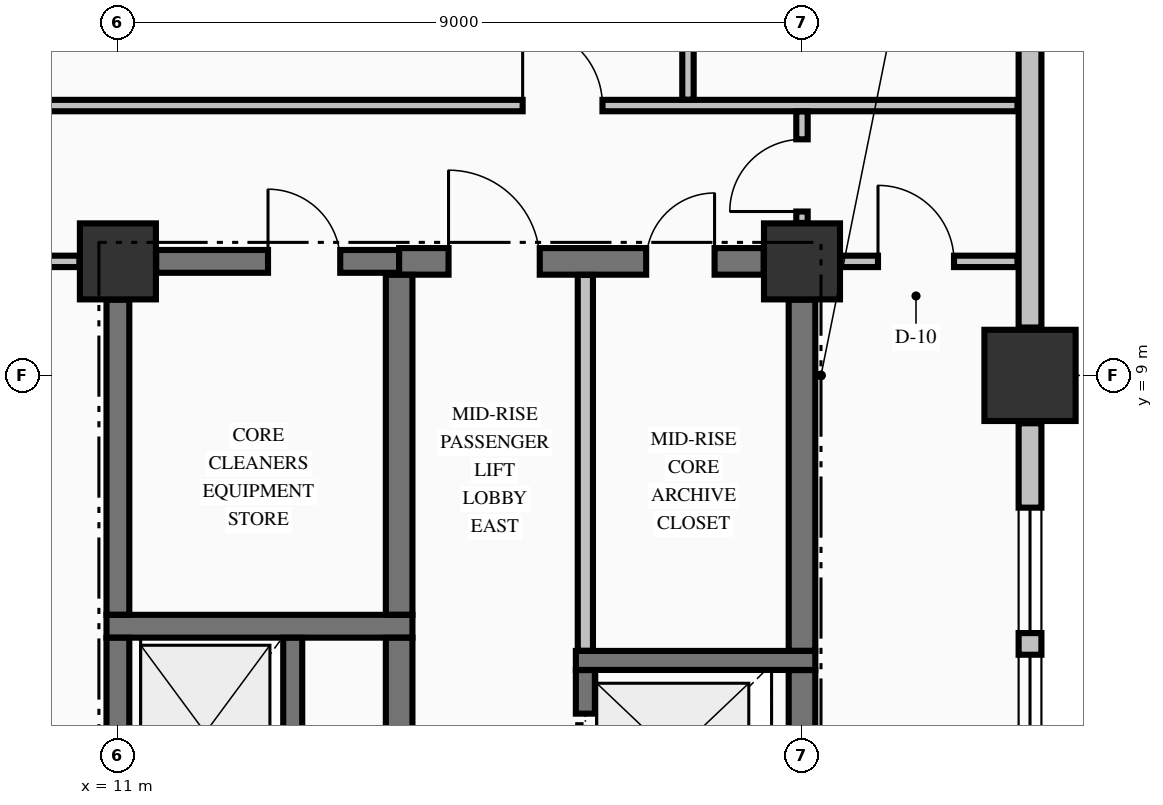
"""IFC4 building model, lengths in metres.
Left out: names, types, materials, properties, quantities, classifications, styles, units other than length and angle.
Written with IfcOpenShell. Run it as: python <this file> out.ifc"""

import sys

from ifc_helpers import new_model, si_unit, direction, frame, frame_2d, origin, origin_2d, place, context, subcontext, project, spatial, rectangle, extrude, element, fill, save


model = new_model("IFC4")
c1 = context("Model", 3, precision=1e-05, world=origin(), true_north=direction((0.0, 1.0)))
c2 = subcontext(c1, "Body", "Model", "MODEL_VIEW")
j1 = project(units=[si_unit("LENGTHUNIT", "METRE"), si_unit("PLANEANGLEUNIT", "RADIAN")], contexts=[c1])
p1 = place(None, origin())
s1 = spatial("IfcSite", under=j1, at=p1, CompositionType="ELEMENT")
p2 = place(p1, origin())
s2 = spatial("IfcBuilding", under=s1, at=p2, CompositionType="ELEMENT")
p3 = place(p2, frame((0.0, 0.0, 135.63)))
s3 = spatial("IfcBuildingStorey", under=s2, at=p3, CompositionType="ELEMENT", Elevation=135.63)
p4 = place(p3, frame((23.0, 9.0, -0.25), z_axis=(0.0, 0.0, 1.0), x_axis=(1.0, 0.0, 0.0)))
e1 = element("IfcColumn", 1, at=p4, inside=s3, PredefinedType="COLUMN", context=c2, shape_type="SweptSolid", body=[
    extrude(rectangle(XDim=1.2, YDim=1.2, at=origin_2d()), origin(), (0.0, 0.0, 1.0), 3.57),
])
for number, where, z_axis, x_axis in (
    (2, (11.0, 10.5, -0.25), (0.0, 0.0, 1.0), (1.0, 0.0, 0.0)),
    (3, (20.0, 10.5, -0.25), (0.0, 0.0, 1.0), (1.0, 0.0, 0.0)),
):
    element("IfcColumn", number, at=place(p3, frame(where, z_axis=z_axis, x_axis=x_axis)), inside=s3, PredefinedType="COLUMN", context=c2, shape_type="SweptSolid", body=[
        extrude(rectangle(XDim=1.0, YDim=1.0, at=origin_2d()), origin(), (0.0, 0.0, 1.0), 3.57),
    ])
p5 = place(p3, frame((23.0, 0.63, 0.0), z_axis=(0.0, 0.0, 1.0), x_axis=(0.0, 1.0, 0.0)))
e4 = element("IfcWall", 4, at=p5, inside=s3, PredefinedType="STANDARD", context=c2, shape_type="SweptSolid", body=[
    extrude(rectangle(XDim=7.74, YDim=0.3, at=frame_2d((3.87, 0.0))), origin(), (0.0, 0.0, 1.0), 2.712),
])
p6 = place(p5, frame((1.11, 0.0, 0.8)))
e5 = element("IfcOpeningElement", 5, at=p6, cuts=e4, PredefinedType="OPENING", context=c2, shape_type="SweptSolid", body=[
    extrude(rectangle(XDim=1.65, YDim=1.7, at=frame_2d((0.825, 0.85))), frame((0.0, 0.16, 0.0), z_axis=(0.0, -1.0, 0.0), x_axis=(1.0, 0.0, 0.0)), (0.0, 0.0, 1.0), 0.32),
])
p7 = place(p5, frame((3.045, 0.0, 0.8)))
e6 = element("IfcOpeningElement", 6, at=p7, cuts=e4, PredefinedType="OPENING", context=c2, shape_type="SweptSolid", body=[
    extrude(rectangle(XDim=1.65, YDim=1.7, at=frame_2d((0.825, 0.85))), frame((0.0, 0.16, 0.0), z_axis=(0.0, -1.0, 0.0), x_axis=(1.0, 0.0, 0.0)), (0.0, 0.0, 1.0), 0.32),
])
p8 = place(p5, frame((4.98, 0.0, 0.8)))
e7 = element("IfcOpeningElement", 7, at=p8, cuts=e4, PredefinedType="OPENING", context=c2, shape_type="SweptSolid", body=[
    extrude(rectangle(XDim=1.65, YDim=1.7, at=frame_2d((0.825, 0.85))), frame((0.0, 0.16, 0.0), z_axis=(0.0, -1.0, 0.0), x_axis=(1.0, 0.0, 0.0)), (0.0, 0.0, 1.0), 0.32),
])
p9 = place(p3, frame((23.0, 9.63, 0.0), z_axis=(0.0, 0.0, 1.0), x_axis=(0.0, 1.0, 0.0)))
e8 = element("IfcWall", 8, at=p9, inside=s3, PredefinedType="STANDARD", context=c2, shape_type="SweptSolid", body=[
    extrude(rectangle(XDim=10.74, YDim=0.3, at=frame_2d((5.37, 0.0))), origin(), (0.0, 0.0, 1.0), 2.712),
])
p10 = place(p3, frame((17.025, 5.25, 0.0), z_axis=(0.0, 0.0, 1.0), x_axis=(1.0, 0.0, 0.0)))
e9 = element("IfcWall", 9, at=p10, inside=s3, PredefinedType="SOLIDWALL", context=c2, shape_type="SweptSolid", body=[
    extrude(rectangle(XDim=3.15, YDim=0.25, at=frame_2d((1.575, 0.0))), origin(), (0.0, 0.0, 1.0), 3.32),
])
p11 = place(p3, frame((10.85, 5.7, 0.0), z_axis=(0.0, 0.0, 1.0), x_axis=(1.0, 0.0, 0.0)))
e10 = element("IfcWall", 10, at=p11, inside=s3, PredefinedType="SHEAR", context=c2, shape_type="SweptSolid", body=[
    extrude(rectangle(XDim=4.025, YDim=0.3, at=frame_2d((2.012, 0.0))), origin(), (0.0, 0.0, 1.0), 3.32),
])
p12 = place(p3, frame((11.504, 10.5, 0.0), z_axis=(0.0, 0.0, 1.0), x_axis=(1.0, 0.0, 0.0)))
e11 = element("IfcWall", 11, at=p12, inside=s3, PredefinedType="SHEAR", context=c2, shape_type="SweptSolid", body=[
    extrude(rectangle(XDim=3.196, YDim=0.3, at=frame_2d((1.598, 0.0))), origin(), (0.0, 0.0, 1.0), 3.32),
])
p13 = place(p12, frame((1.471, 0.0, 0.0)))
e12 = element("IfcOpeningElement", 12, at=p13, cuts=e11, PredefinedType="OPENING", context=c2, shape_type="SweptSolid", body=[
    extrude(rectangle(XDim=0.95, YDim=2.15, at=frame_2d((0.475, 1.075))), frame((0.0, 0.16, 0.0), z_axis=(0.0, -1.0, 0.0), x_axis=(1.0, 0.0, 0.0)), (0.0, 0.0, 1.0), 0.32),
])
p14 = place(p3, frame((14.7, 10.5, 0.0), z_axis=(0.0, 0.0, 1.0), x_axis=(1.0, 0.0, 0.0)))
e13 = element("IfcWall", 13, at=p14, inside=s3, PredefinedType="SHEAR", context=c2, shape_type="SweptSolid", body=[
    extrude(rectangle(XDim=4.796, YDim=0.35, at=frame_2d((2.398, 0.0))), origin(), (0.0, 0.0, 1.0), 3.32),
])
p15 = place(p14, frame((0.65, 0.0, 0.0)))
e14 = element("IfcOpeningElement", 14, at=p15, cuts=e13, PredefinedType="OPENING", context=c2, shape_type="SweptSolid", body=[
    extrude(rectangle(XDim=1.2, YDim=2.15, at=frame_2d((0.6, 1.075))), frame((0.0, 0.185, 0.0), z_axis=(0.0, -1.0, 0.0), x_axis=(1.0, 0.0, 0.0)), (0.0, 0.0, 1.0), 0.37),
])
p16 = place(p14, frame((3.25, 0.0, 0.0)))
e15 = element("IfcOpeningElement", 15, at=p16, cuts=e13, PredefinedType="OPENING", context=c2, shape_type="SweptSolid", body=[
    extrude(rectangle(XDim=0.9, YDim=2.15, at=frame_2d((0.45, 1.075))), frame((0.0, 0.185, 0.0), z_axis=(0.0, -1.0, 0.0), x_axis=(1.0, 0.0, 0.0)), (0.0, 0.0, 1.0), 0.37),
])
p17 = place(p3, frame((-10.494, 10.5, 0.0), z_axis=(0.0, 0.0, 1.0), x_axis=(1.0, 0.0, 0.0)))
e16 = element("IfcWall", 16, at=p17, inside=s3, PredefinedType="PARTITIONING", context=c2, shape_type="SweptSolid", body=[
    extrude(rectangle(XDim=20.988, YDim=0.15, at=frame_2d((10.494, 0.0))), origin(), (0.0, 0.0, 1.0), 3.32),
])
p18 = place(p17, frame((8.194, 0.0, 0.0)))
e17 = element("IfcOpeningElement", 17, at=p18, cuts=e16, PredefinedType="OPENING", context=c2, shape_type="SweptSolid", body=[
    extrude(rectangle(XDim=1.1, YDim=2.15, at=frame_2d((0.55, 1.075))), frame((0.0, 0.085, 0.0), z_axis=(0.0, -1.0, 0.0), x_axis=(1.0, 0.0, 0.0)), (0.0, 0.0, 1.0), 0.17),
])
p19 = place(p3, frame((20.506, 10.5, 0.0), z_axis=(0.0, 0.0, 1.0), x_axis=(1.0, 0.0, 0.0)))
e18 = element("IfcWall", 18, at=p19, inside=s3, PredefinedType="PARTITIONING", context=c2, shape_type="SweptSolid", body=[
    extrude(rectangle(XDim=2.329, YDim=0.15, at=frame_2d((1.165, 0.0))), origin(), (0.0, 0.0, 1.0), 3.32),
])
p20 = place(p19, frame((0.494, 0.0, 0.0)))
e19 = element("IfcOpeningElement", 19, at=p20, cuts=e18, PredefinedType="OPENING", context=c2, shape_type="SweptSolid", body=[
    extrude(rectangle(XDim=1.0, YDim=2.15, at=frame_2d((0.5, 1.075))), frame((0.0, 0.085, 0.0), z_axis=(0.0, -1.0, 0.0), x_axis=(1.0, 0.0, 0.0)), (0.0, 0.0, 1.0), 0.17),
])
p21 = place(p3, frame((-27.835, 12.55, 0.0), z_axis=(0.0, 0.0, 1.0), x_axis=(1.0, 0.0, 0.0)))
e20 = element("IfcWall", 20, at=p21, inside=s3, PredefinedType="PARTITIONING", context=c2, shape_type="SweptSolid", body=[
    extrude(rectangle(XDim=50.67, YDim=0.15, at=frame_2d((25.335, 0.0))), origin(), (0.0, 0.0, 1.0), 3.32),
])
p22 = place(p21, frame((13.81, 0.0, 0.0)))
e21 = element("IfcOpeningElement", 21, at=p22, cuts=e20, PredefinedType="OPENING", context=c2, shape_type="SweptSolid", body=[
    extrude(rectangle(XDim=1.05, YDim=2.15, at=frame_2d((0.525, 1.075))), frame((0.0, 0.085, 0.0), z_axis=(0.0, -1.0, 0.0), x_axis=(1.0, 0.0, 0.0)), (0.0, 0.0, 1.0), 0.17),
])
p23 = place(p21, frame((25.11, 0.0, 0.0)))
e22 = element("IfcOpeningElement", 22, at=p23, cuts=e20, PredefinedType="OPENING", context=c2, shape_type="SweptSolid", body=[
    extrude(rectangle(XDim=1.05, YDim=2.15, at=frame_2d((0.525, 1.075))), frame((0.0, 0.085, 0.0), z_axis=(0.0, -1.0, 0.0), x_axis=(1.0, 0.0, 0.0)), (0.0, 0.0, 1.0), 0.17),
])
p24 = place(p21, frame((44.16, 0.0, 0.0)))
e23 = element("IfcOpeningElement", 23, at=p24, cuts=e20, PredefinedType="OPENING", context=c2, shape_type="SweptSolid", body=[
    extrude(rectangle(XDim=1.05, YDim=2.15, at=frame_2d((0.525, 1.075))), frame((0.0, 0.085, 0.0), z_axis=(0.0, -1.0, 0.0), x_axis=(1.0, 0.0, 0.0)), (0.0, 0.0, 1.0), 0.17),
])
p25 = place(p3, frame((11.0, 3.052, 0.0), z_axis=(0.0, 0.0, 1.0), x_axis=(0.0, 1.0, 0.0)))
e24 = element("IfcWall", 24, at=p25, inside=s3, PredefinedType="SHEAR", context=c2, shape_type="SweptSolid", body=[
    extrude(rectangle(XDim=2.496, YDim=0.3, at=frame_2d((1.248, 0.0))), origin(), (0.0, 0.0, 1.0), 3.32),
])
p26 = place(p3, frame((11.0, 5.852, 0.0), z_axis=(0.0, 0.0, 1.0), x_axis=(0.0, 1.0, 0.0)))
e25 = element("IfcWall", 25, at=p26, inside=s3, PredefinedType="SHEAR", context=c2, shape_type="SweptSolid", body=[
    extrude(rectangle(XDim=4.144, YDim=0.3, at=frame_2d((2.072, 0.0))), origin(), (0.0, 0.0, 1.0), 3.32),
])
p27 = place(p3, frame((13.3, 3.052, 0.0), z_axis=(0.0, 0.0, 1.0), x_axis=(0.0, 1.0, 0.0)))
e26 = element("IfcWall", 26, at=p27, inside=s3, PredefinedType="SOLIDWALL", context=c2, shape_type="SweptSolid", body=[
    extrude(rectangle(XDim=2.496, YDim=0.25, at=frame_2d((1.248, 0.0))), origin(), (0.0, 0.0, 1.0), 3.32),
])
p28 = place(p3, frame((14.7, 3.052, 0.0), z_axis=(0.0, 0.0, 1.0), x_axis=(0.0, 1.0, 0.0)))
e27 = element("IfcWall", 27, at=p28, inside=s3, PredefinedType="SHEAR", context=c2, shape_type="SweptSolid", body=[
    extrude(rectangle(XDim=2.496, YDim=0.35, at=frame_2d((1.248, 0.0))), origin(), (0.0, 0.0, 1.0), 3.32),
])
p29 = place(p3, frame((14.7, 5.852, 0.0), z_axis=(0.0, 0.0, 1.0), x_axis=(0.0, 1.0, 0.0)))
e28 = element("IfcWall", 28, at=p29, inside=s3, PredefinedType="SHEAR", context=c2, shape_type="SweptSolid", body=[
    extrude(rectangle(XDim=4.471, YDim=0.35, at=frame_2d((2.235, 0.0))), origin(), (0.0, 0.0, 1.0), 3.32),
])
p30 = place(p3, frame((17.15, 2.877, 0.0), z_axis=(0.0, 0.0, 1.0), x_axis=(0.0, 1.0, 0.0)))
e29 = element("IfcWall", 29, at=p30, inside=s3, PredefinedType="SOLIDWALL", context=c2, shape_type="SweptSolid", body=[
    extrude(rectangle(XDim=2.246, YDim=0.25, at=frame_2d((1.123, 0.0))), origin(), (0.0, 0.0, 1.0), 3.32),
])
p31 = place(p30, frame((0.573, 0.0, 0.0)))
e30 = element("IfcOpeningElement", 30, at=p31, cuts=e29, PredefinedType="OPENING", context=c2, shape_type="SweptSolid", body=[
    extrude(rectangle(XDim=1.1, YDim=2.2, at=frame_2d((0.55, 1.1))), frame((0.0, 0.135, 0.0), z_axis=(0.0, -1.0, 0.0), x_axis=(1.0, 0.0, 0.0)), (0.0, 0.0, 1.0), 0.27),
])
p32 = place(p3, frame((20.0, 2.877, 0.0), z_axis=(0.0, 0.0, 1.0), x_axis=(0.0, 1.0, 0.0)))
e31 = element("IfcWall", 31, at=p32, inside=s3, PredefinedType="SHEAR", context=c2, shape_type="SweptSolid", body=[
    extrude(rectangle(XDim=2.246, YDim=0.35, at=frame_2d((1.123, 0.0))), origin(), (0.0, 0.0, 1.0), 3.32),
])
p33 = place(p3, frame((20.0, 5.377, 0.0), z_axis=(0.0, 0.0, 1.0), x_axis=(0.0, 1.0, 0.0)))
e32 = element("IfcWall", 32, at=p33, inside=s3, PredefinedType="SHEAR", context=c2, shape_type="SweptSolid", body=[
    extrude(rectangle(XDim=4.619, YDim=0.35, at=frame_2d((2.31, 0.0))), origin(), (0.0, 0.0, 1.0), 3.32),
])
p34 = place(p3, frame((17.15, 5.378, 0.0), z_axis=(0.0, 0.0, 1.0), x_axis=(0.0, 1.0, 0.0)))
e33 = element("IfcWall", 33, at=p34, inside=s3, PredefinedType="PARTITIONING", context=c2, shape_type="SweptSolid", body=[
    extrude(rectangle(XDim=4.944, YDim=0.2, at=frame_2d((2.472, 0.0))), origin(), (0.0, 0.0, 1.0), 3.32),
])
p35 = place(p3, frame((18.5, 12.628, 0.0), z_axis=(0.0, 0.0, 1.0), x_axis=(0.0, 1.0, 0.0)))
e34 = element("IfcWall", 34, at=p35, inside=s3, PredefinedType="PARTITIONING", context=c2, shape_type="SweptSolid", body=[
    extrude(rectangle(XDim=7.766, YDim=0.15, at=frame_2d((3.883, 0.0))), origin(), (0.0, 0.0, 1.0), 3.32),
])
p36 = place(p3, frame((20.0, 11.006, 0.0), z_axis=(0.0, 0.0, 1.0), x_axis=(0.0, 1.0, 0.0)))
e35 = element("IfcWall", 35, at=p36, inside=s3, PredefinedType="PARTITIONING", context=c2, shape_type="SweptSolid", body=[
    extrude(rectangle(XDim=1.466, YDim=0.15, at=frame_2d((0.733, 0.0))), origin(), (0.0, 0.0, 1.0), 2.81),
])
p37 = place(p36, frame((0.15, 0.0, 0.0)))
e36 = element("IfcOpeningElement", 36, at=p37, cuts=e35, PredefinedType="OPENING", context=c2, shape_type="SweptSolid", body=[
    extrude(rectangle(XDim=0.95, YDim=2.15, at=frame_2d((0.475, 1.075))), frame((0.0, 0.085, 0.0), z_axis=(0.0, -1.0, 0.0), x_axis=(1.0, 0.0, 0.0)), (0.0, 0.0, 1.0), 0.17),
])
p38 = place(p7, origin())
e37 = element("IfcWindow", 37, at=p38, inside=s3, PartitioningType="SINGLE_PANEL", PredefinedType="WINDOW", context=c2, shape_type="SweptSolid", body=[
    extrude(rectangle(XDim=1.65, YDim=1.7, at=frame_2d((0.825, 0.85))), frame((0.0, 0.03, 0.0), z_axis=(0.0, -1.0, 0.0), x_axis=(1.0, 0.0, 0.0)), (0.0, 0.0, 1.0), 0.06),
])
fill(e6, e37)
p39 = place(p8, origin())
e38 = element("IfcWindow", 38, at=p39, inside=s3, PartitioningType="SINGLE_PANEL", PredefinedType="WINDOW", context=c2, shape_type="SweptSolid", body=[
    extrude(rectangle(XDim=1.65, YDim=1.7, at=frame_2d((0.825, 0.85))), frame((0.0, 0.03, 0.0), z_axis=(0.0, -1.0, 0.0), x_axis=(1.0, 0.0, 0.0)), (0.0, 0.0, 1.0), 0.06),
])
fill(e7, e38)
p40 = place(p13, origin())
e39 = element("IfcDoor", 39, at=p40, inside=s3, OperationType="SINGLE_SWING_LEFT", PredefinedType="DOOR", context=c2, shape_type="SweptSolid", body=[
    extrude(rectangle(XDim=0.95, YDim=2.15, at=frame_2d((0.475, 1.075))), frame((0.0, 0.025, 0.0), z_axis=(0.0, -1.0, 0.0), x_axis=(1.0, 0.0, 0.0)), (0.0, 0.0, 1.0), 0.05),
])
fill(e12, e39)
p41 = place(p31, origin())
e40 = element("IfcDoor", 40, at=p41, inside=s3, OperationType="SLIDING_TO_RIGHT", PredefinedType="DOOR", context=c2, shape_type="SweptSolid", body=[
    extrude(rectangle(XDim=1.1, YDim=2.2, at=frame_2d((0.55, 1.1))), frame((0.0, 0.025, 0.0), z_axis=(0.0, -1.0, 0.0), x_axis=(1.0, 0.0, 0.0)), (0.0, 0.0, 1.0), 0.05),
])
fill(e30, e40)
p42 = place(p15, origin())
e41 = element("IfcDoor", 41, at=p42, inside=s3, OperationType="SINGLE_SWING_LEFT", PredefinedType="DOOR", context=c2, shape_type="SweptSolid", body=[
    extrude(rectangle(XDim=1.2, YDim=2.15, at=frame_2d((0.6, 1.075))), frame((0.0, 0.025, 0.0), z_axis=(0.0, -1.0, 0.0), x_axis=(1.0, 0.0, 0.0)), (0.0, 0.0, 1.0), 0.05),
])
fill(e14, e41)
p43 = place(p16, origin())
e42 = element("IfcDoor", 42, at=p43, inside=s3, OperationType="SINGLE_SWING_RIGHT", PredefinedType="DOOR", context=c2, shape_type="SweptSolid", body=[
    extrude(rectangle(XDim=0.9, YDim=2.15, at=frame_2d((0.45, 1.075))), frame((0.0, 0.025, 0.0), z_axis=(0.0, -1.0, 0.0), x_axis=(1.0, 0.0, 0.0)), (0.0, 0.0, 1.0), 0.05),
])
fill(e15, e42)
p44 = place(p24, origin())
e43 = element("IfcDoor", 43, at=p44, inside=s3, OperationType="SINGLE_SWING_LEFT", PredefinedType="DOOR", context=c2, shape_type="SweptSolid", body=[
    extrude(rectangle(XDim=1.05, YDim=2.15, at=frame_2d((0.525, 1.075))), frame((0.0, 0.025, 0.0), z_axis=(0.0, -1.0, 0.0), x_axis=(1.0, 0.0, 0.0)), (0.0, 0.0, 1.0), 0.05),
])
fill(e23, e43)
p45 = place(p37, origin())
e44 = element("IfcDoor", 44, at=p45, inside=s3, OperationType="SINGLE_SWING_LEFT", PredefinedType="DOOR", context=c2, shape_type="SweptSolid", body=[
    extrude(rectangle(XDim=0.95, YDim=2.15, at=frame_2d((0.475, 1.075))), frame((0.0, 0.025, 0.0), z_axis=(0.0, -1.0, 0.0), x_axis=(1.0, 0.0, 0.0)), (0.0, 0.0, 1.0), 0.05),
])
fill(e36, e44)
p46 = place(p20, origin())
e45 = element("IfcDoor", 45, at=p46, inside=s3, OperationType="SINGLE_SWING_LEFT", PredefinedType="DOOR", context=c2, shape_type="SweptSolid", body=[
    extrude(rectangle(XDim=1.0, YDim=2.15, at=frame_2d((0.5, 1.075))), frame((0.0, 0.025, 0.0), z_axis=(0.0, -1.0, 0.0), x_axis=(1.0, 0.0, 0.0)), (0.0, 0.0, 1.0), 0.05),
])
fill(e19, e45)
save(model, sys.argv[1])
